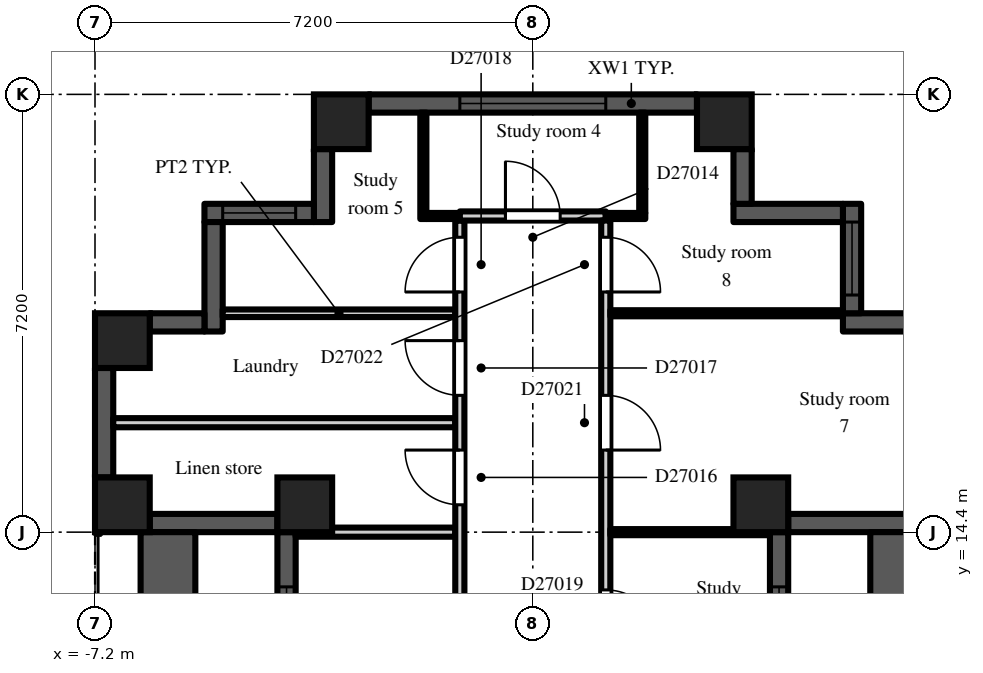
"""IFC4 building model, lengths in metres.
Left out: names, types, materials, properties, quantities, classifications, styles, units other than length and angle.
Written with IfcOpenShell. Run it as: python <this file> out.ifc"""

import sys

from ifc_helpers import new_model, si_unit, direction, frame, frame_2d, origin, origin_2d, place, context, subcontext, project, spatial, rectangle, extrude, element, fill, save


model = new_model("IFC4")
c1 = context("Model", 3, precision=1e-05, world=origin(), true_north=direction((0.0, 1.0)))
c2 = subcontext(c1, "Body", "Model", "MODEL_VIEW")
j1 = project(units=[si_unit("LENGTHUNIT", "METRE"), si_unit("PLANEANGLEUNIT", "RADIAN")], contexts=[c1])
p1 = place(None, origin())
s1 = spatial("IfcSite", under=j1, at=p1, CompositionType="ELEMENT")
p2 = place(p1, origin())
s2 = spatial("IfcBuilding", under=s1, at=p2, CompositionType="ELEMENT")
p3 = place(p2, frame((0.0, 0.0, 191.7)))
s3 = spatial("IfcBuildingStorey", under=s2, at=p3, CompositionType="ELEMENT", Elevation=191.7)
for number, where, z_axis, x_axis in (
    (1, (-6.75, 14.85, 0.0), (0.0, 0.0, 1.0), (1.0, 0.0, 0.0)),
    (2, (-6.75, 17.55, 0.0), (0.0, 0.0, 1.0), (1.0, 0.0, 0.0)),
    (3, (-3.75, 14.85, 0.0), (0.0, 0.0, 1.0), (1.0, 0.0, 0.0)),
    (4, (-3.15, 21.15, 0.0), (0.0, 0.0, 1.0), (1.0, 0.0, 0.0)),
    (5, (3.15, 21.15, 0.0), (0.0, 0.0, 1.0), (1.0, 0.0, 0.0)),
    (6, (3.75, 14.85, 0.0), (0.0, 0.0, 1.0), (1.0, 0.0, 0.0)),
):
    element("IfcColumn", number, at=place(p3, frame(where, z_axis=z_axis, x_axis=x_axis)), inside=s3, PredefinedType="COLUMN", context=c2, shape_type="SweptSolid", body=[
        extrude(rectangle(XDim=0.9, YDim=0.9, at=origin_2d()), origin(), (0.0, 0.0, 1.0), 3.0),
    ])
p4 = place(p3, frame((4.05, 7.2, 0.0), z_axis=(0.0, 0.0, 1.0), x_axis=(0.0, 1.0, 0.0)))
e7 = element("IfcWall", 7, at=p4, inside=s3, PredefinedType="SOLIDWALL", context=c2, shape_type="SweptSolid", body=[
    extrude(rectangle(XDim=7.2, YDim=0.3, at=frame_2d((3.6, 0.0))), origin(), (0.0, 0.0, 1.0), 2.55),
])
p5 = place(p4, frame((3.0, 0.0, 0.0)))
e8 = element("IfcOpeningElement", 8, at=p5, cuts=e7, PredefinedType="OPENING", context=c2, shape_type="SweptSolid", body=[
    extrude(rectangle(XDim=1.2, YDim=2.05, at=frame_2d((0.6, 1.025))), frame((0.0, 0.16, 0.0), z_axis=(0.0, -1.0, 0.0), x_axis=(1.0, 0.0, 0.0)), (0.0, 0.0, 1.0), 0.32),
])
p6 = place(p4, frame((0.9, 0.0, 0.2)))
e9 = element("IfcOpeningElement", 9, at=p6, cuts=e7, PredefinedType="OPENING", context=c2, shape_type="SweptSolid", body=[
    extrude(rectangle(XDim=1.8, YDim=1.85, at=frame_2d((0.9, 0.925))), frame((0.0, 0.16, 0.0), z_axis=(0.0, -1.0, 0.0), x_axis=(1.0, 0.0, 0.0)), (0.0, 0.0, 1.0), 0.32),
])
p7 = place(p4, frame((4.5, 0.0, 0.2)))
e10 = element("IfcOpeningElement", 10, at=p7, cuts=e7, PredefinedType="OPENING", context=c2, shape_type="SweptSolid", body=[
    extrude(rectangle(XDim=1.8, YDim=1.85, at=frame_2d((0.9, 0.925))), frame((0.0, 0.16, 0.0), z_axis=(0.0, -1.0, 0.0), x_axis=(1.0, 0.0, 0.0)), (0.0, 0.0, 1.0), 0.32),
])
p8 = place(p3, frame((4.2, 14.55, 0.0), z_axis=(0.0, 0.0, 1.0), x_axis=(1.0, 0.0, 0.0)))
e11 = element("IfcWall", 11, at=p8, inside=s3, PredefinedType="SOLIDWALL", context=c2, shape_type="SweptSolid", body=[
    extrude(rectangle(XDim=2.1, YDim=0.3, at=frame_2d((1.05, 0.0))), origin(), (0.0, 0.0, 1.0), 2.55),
])
p9 = place(p3, frame((6.3, 17.85, 0.0), z_axis=(0.0, 0.0, 1.0), x_axis=(-1.0, 0.0, 0.0)))
e12 = element("IfcWall", 12, at=p9, inside=s3, PredefinedType="SOLIDWALL", context=c2, shape_type="SweptSolid", body=[
    extrude(rectangle(XDim=1.2, YDim=0.3, at=frame_2d((0.6, 0.0))), origin(), (0.0, 0.0, 1.0), 2.55),
])
p10 = place(p3, frame((5.25, 18.0, 0.0), z_axis=(0.0, 0.0, 1.0), x_axis=(0.0, 1.0, 0.0)))
e13 = element("IfcWall", 13, at=p10, inside=s3, PredefinedType="SOLIDWALL", context=c2, shape_type="SweptSolid", body=[
    extrude(rectangle(XDim=1.8, YDim=0.3, at=frame_2d((0.9, 0.0))), origin(), (0.0, 0.0, 1.0), 2.55),
])
p11 = place(p10, frame((0.3, 0.0, 0.2)))
e14 = element("IfcOpeningElement", 14, at=p11, cuts=e13, PredefinedType="OPENING", context=c2, shape_type="SweptSolid", body=[
    extrude(rectangle(XDim=1.2, YDim=1.85, at=frame_2d((0.6, 0.925))), frame((0.0, 0.16, 0.0), z_axis=(0.0, -1.0, 0.0), x_axis=(1.0, 0.0, 0.0)), (0.0, 0.0, 1.0), 0.32),
])
p12 = place(p3, frame((5.1, 19.65, 0.0), z_axis=(0.0, 0.0, 1.0), x_axis=(-1.0, 0.0, 0.0)))
e15 = element("IfcWall", 15, at=p12, inside=s3, PredefinedType="SOLIDWALL", context=c2, shape_type="SweptSolid", body=[
    extrude(rectangle(XDim=1.8, YDim=0.3, at=frame_2d((0.9, 0.0))), origin(), (0.0, 0.0, 1.0), 2.55),
])
p13 = place(p3, frame((3.45, 19.8, 0.0), z_axis=(0.0, 0.0, 1.0), x_axis=(0.0, 1.0, 0.0)))
e16 = element("IfcWall", 16, at=p13, inside=s3, PredefinedType="SOLIDWALL", context=c2, shape_type="SweptSolid", body=[
    extrude(rectangle(XDim=0.9, YDim=0.3, at=frame_2d((0.45, 0.0))), origin(), (0.0, 0.0, 1.0), 2.55),
])
p14 = place(p3, frame((2.7, 21.45, 0.0), z_axis=(0.0, 0.0, 1.0), x_axis=(-1.0, 0.0, 0.0)))
e17 = element("IfcWall", 17, at=p14, inside=s3, PredefinedType="SOLIDWALL", context=c2, shape_type="SweptSolid", body=[
    extrude(rectangle(XDim=5.4, YDim=0.3, at=frame_2d((2.7, 0.0))), origin(), (0.0, 0.0, 1.0), 2.3),
])
p15 = place(p14, frame((1.5, 0.0, 0.2)))
e18 = element("IfcOpeningElement", 18, at=p15, cuts=e17, PredefinedType="OPENING", context=c2, shape_type="SweptSolid", body=[
    extrude(rectangle(XDim=2.4, YDim=1.85, at=frame_2d((1.2, 0.925))), frame((0.0, 0.16, 0.0), z_axis=(0.0, -1.0, 0.0), x_axis=(1.0, 0.0, 0.0)), (0.0, 0.0, 1.0), 0.32),
])
p16 = place(p3, frame((-3.45, 20.7, 0.0), z_axis=(0.0, 0.0, 1.0), x_axis=(0.0, -1.0, 0.0)))
e19 = element("IfcWall", 19, at=p16, inside=s3, PredefinedType="SOLIDWALL", context=c2, shape_type="SweptSolid", body=[
    extrude(rectangle(XDim=1.2, YDim=0.3, at=frame_2d((0.6, 0.0))), origin(), (0.0, 0.0, 1.0), 2.55),
])
p17 = place(p3, frame((-3.6, 19.65, 0.0), z_axis=(0.0, 0.0, 1.0), x_axis=(-1.0, 0.0, 0.0)))
e20 = element("IfcWall", 20, at=p17, inside=s3, PredefinedType="SOLIDWALL", context=c2, shape_type="SweptSolid", body=[
    extrude(rectangle(XDim=1.8, YDim=0.3, at=frame_2d((0.9, 0.0))), origin(), (0.0, 0.0, 1.0), 2.55),
])
p18 = place(p17, frame((0.3, 0.0, 0.2)))
e21 = element("IfcOpeningElement", 21, at=p18, cuts=e20, PredefinedType="OPENING", context=c2, shape_type="SweptSolid", body=[
    extrude(rectangle(XDim=1.2, YDim=1.85, at=frame_2d((0.6, 0.925))), frame((0.0, 0.16, 0.0), z_axis=(0.0, -1.0, 0.0), x_axis=(1.0, 0.0, 0.0)), (0.0, 0.0, 1.0), 0.32),
])
p19 = place(p3, frame((-5.25, 19.5, 0.0), z_axis=(0.0, 0.0, 1.0), x_axis=(0.0, -1.0, 0.0)))
e22 = element("IfcWall", 22, at=p19, inside=s3, PredefinedType="SOLIDWALL", context=c2, shape_type="SweptSolid", body=[
    extrude(rectangle(XDim=1.8, YDim=0.3, at=frame_2d((0.9, 0.0))), origin(), (0.0, 0.0, 1.0), 2.55),
])
p20 = place(p3, frame((-5.4, 17.85, 0.0), z_axis=(0.0, 0.0, 1.0), x_axis=(-1.0, 0.0, 0.0)))
e23 = element("IfcWall", 23, at=p20, inside=s3, PredefinedType="SOLIDWALL", context=c2, shape_type="SweptSolid", body=[
    extrude(rectangle(XDim=0.9, YDim=0.3, at=frame_2d((0.45, 0.0))), origin(), (0.0, 0.0, 1.0), 2.55),
])
p21 = place(p3, frame((-7.05, 17.1, 0.0), z_axis=(0.0, 0.0, 1.0), x_axis=(0.0, -1.0, 0.0)))
e24 = element("IfcWall", 24, at=p21, inside=s3, PredefinedType="SOLIDWALL", context=c2, shape_type="SweptSolid", body=[
    extrude(rectangle(XDim=1.8, YDim=0.3, at=frame_2d((0.9, 0.0))), origin(), (0.0, 0.0, 1.0), 2.3),
])
p22 = place(p3, frame((-6.3, 14.55, 0.0), z_axis=(0.0, 0.0, 1.0), x_axis=(1.0, 0.0, 0.0)))
e25 = element("IfcWall", 25, at=p22, inside=s3, PredefinedType="SOLIDWALL", context=c2, shape_type="SweptSolid", body=[
    extrude(rectangle(XDim=2.1, YDim=0.3, at=frame_2d((1.05, 0.0))), origin(), (0.0, 0.0, 1.0), 2.55),
])
p23 = place(p3, frame((-4.05, 14.4, 0.0), z_axis=(0.0, 0.0, 1.0), x_axis=(0.0, -1.0, 0.0)))
e26 = element("IfcWall", 26, at=p23, inside=s3, PredefinedType="SOLIDWALL", context=c2, shape_type="SweptSolid", body=[
    extrude(rectangle(XDim=7.2, YDim=0.3, at=frame_2d((3.6, 0.0))), origin(), (0.0, 0.0, 1.0), 2.55),
])
p24 = place(p23, frame((3.0, 0.0, 0.0)))
e27 = element("IfcOpeningElement", 27, at=p24, cuts=e26, PredefinedType="OPENING", context=c2, shape_type="SweptSolid", body=[
    extrude(rectangle(XDim=1.2, YDim=2.05, at=frame_2d((0.6, 1.025))), frame((0.0, 0.16, 0.0), z_axis=(0.0, -1.0, 0.0), x_axis=(1.0, 0.0, 0.0)), (0.0, 0.0, 1.0), 0.32),
])
p25 = place(p23, frame((0.9, 0.0, 0.2)))
e28 = element("IfcOpeningElement", 28, at=p25, cuts=e26, PredefinedType="OPENING", context=c2, shape_type="SweptSolid", body=[
    extrude(rectangle(XDim=1.8, YDim=1.85, at=frame_2d((0.9, 0.925))), frame((0.0, 0.16, 0.0), z_axis=(0.0, -1.0, 0.0), x_axis=(1.0, 0.0, 0.0)), (0.0, 0.0, 1.0), 0.32),
])
p26 = place(p23, frame((4.5, 0.0, 0.2)))
e29 = element("IfcOpeningElement", 29, at=p26, cuts=e26, PredefinedType="OPENING", context=c2, shape_type="SweptSolid", body=[
    extrude(rectangle(XDim=1.8, YDim=1.85, at=frame_2d((0.9, 0.925))), frame((0.0, 0.16, 0.0), z_axis=(0.0, -1.0, 0.0), x_axis=(1.0, 0.0, 0.0)), (0.0, 0.0, 1.0), 0.32),
])
for number, where, z_axis, x_axis in (
    (30, (6.0, 7.2, 0.0), (0.0, 0.0, 1.0), (0.0, 1.0, 0.0)),
    (31, (-6.0, 7.2, 0.0), (0.0, 0.0, 1.0), (0.0, 1.0, 0.0)),
):
    element("IfcWall", number, at=place(p3, frame(where, z_axis=z_axis, x_axis=x_axis)), inside=s3, PredefinedType="PARAPET", context=c2, shape_type="SweptSolid", body=[
        extrude(rectangle(XDim=7.2, YDim=0.9, at=frame_2d((3.6, 0.0))), origin(), (0.0, 0.0, 1.0), 0.8),
    ])
p27 = place(p3, frame((-6.9, 16.2, 0.0), z_axis=(0.0, 0.0, 1.0), x_axis=(1.0, 0.0, 0.0)))
e32 = element("IfcWall", 32, at=p27, inside=s3, PredefinedType="PARTITIONING", context=c2, shape_type="SweptSolid", body=[
    extrude(rectangle(XDim=5.625, YDim=0.15, at=frame_2d((2.812, 0.0))), origin(), (0.0, 0.0, 1.0), 2.55),
])
p28 = place(p3, frame((-5.1, 18.0, 0.0), z_axis=(0.0, 0.0, 1.0), x_axis=(1.0, 0.0, 0.0)))
e33 = element("IfcWall", 33, at=p28, inside=s3, PredefinedType="PARTITIONING", context=c2, shape_type="SweptSolid", body=[
    extrude(rectangle(XDim=3.825, YDim=0.125, at=frame_2d((1.913, 0.0))), origin(), (0.0, 0.0, 1.0), 2.55),
])
p29 = place(p3, frame((-3.9, 14.4, 0.0), z_axis=(0.0, 0.0, 1.0), x_axis=(1.0, 0.0, 0.0)))
e34 = element("IfcWall", 34, at=p29, inside=s3, PredefinedType="PARTITIONING", context=c2, shape_type="SweptSolid", body=[
    extrude(rectangle(XDim=2.625, YDim=0.15, at=frame_2d((1.312, 0.0))), origin(), (0.0, 0.0, 1.0), 2.55),
])
p30 = place(p3, frame((-1.8, 19.55, 0.0), z_axis=(0.0, 0.0, 1.0), x_axis=(0.0, 1.0, 0.0)))
e35 = element("IfcWall", 35, at=p30, inside=s3, PredefinedType="PARTITIONING", context=c2, shape_type="SweptSolid", body=[
    extrude(rectangle(XDim=1.75, YDim=0.1, at=frame_2d((0.875, 0.0))), origin(), (0.0, 0.0, 1.0), 2.55),
])
p31 = place(p3, frame((-1.75, 19.6, 0.0), z_axis=(0.0, 0.0, 1.0), x_axis=(1.0, 0.0, 0.0)))
e36 = element("IfcWall", 36, at=p31, inside=s3, PredefinedType="PARTITIONING", context=c2, shape_type="SweptSolid", body=[
    extrude(rectangle(XDim=0.55, YDim=0.1, at=frame_2d((0.275, 0.0))), origin(), (0.0, 0.0, 1.0), 2.55),
])
p32 = place(p3, frame((-1.2, 1.275, 0.0), z_axis=(0.0, 0.0, 1.0), x_axis=(0.0, 1.0, 0.0)))
e37 = element("IfcWall", 37, at=p32, inside=s3, PredefinedType="PARTITIONING", context=c2, shape_type="SweptSolid", body=[
    extrude(rectangle(XDim=18.25, YDim=0.15, at=frame_2d((9.125, 0.0))), origin(), (0.0, 0.0, 1.0), 2.55),
])
p33 = place(p32, frame((2.475, 0.0, 0.0)))
e38 = element("IfcOpeningElement", 38, at=p33, cuts=e37, PredefinedType="OPENING", context=c2, shape_type="SweptSolid", body=[
    extrude(rectangle(XDim=0.9, YDim=2.1, at=frame_2d((0.45, 1.05))), frame((0.0, 0.085, 0.0), z_axis=(0.0, -1.0, 0.0), x_axis=(1.0, 0.0, 0.0)), (0.0, 0.0, 1.0), 0.17),
])
p34 = place(p32, frame((10.875, 0.0, 0.0)))
e39 = element("IfcOpeningElement", 39, at=p34, cuts=e37, PredefinedType="OPENING", context=c2, shape_type="SweptSolid", body=[
    extrude(rectangle(XDim=0.9, YDim=2.1, at=frame_2d((0.45, 1.05))), frame((0.0, 0.085, 0.0), z_axis=(0.0, -1.0, 0.0), x_axis=(1.0, 0.0, 0.0)), (0.0, 0.0, 1.0), 0.17),
])
p35 = place(p32, frame((13.575, 0.0, 0.0)))
e40 = element("IfcOpeningElement", 40, at=p35, cuts=e37, PredefinedType="OPENING", context=c2, shape_type="SweptSolid", body=[
    extrude(rectangle(XDim=0.9, YDim=2.1, at=frame_2d((0.45, 1.05))), frame((0.0, 0.085, 0.0), z_axis=(0.0, -1.0, 0.0), x_axis=(1.0, 0.0, 0.0)), (0.0, 0.0, 1.0), 0.17),
])
p36 = place(p32, frame((15.375, 0.0, 0.0)))
e41 = element("IfcOpeningElement", 41, at=p36, cuts=e37, PredefinedType="OPENING", context=c2, shape_type="SweptSolid", body=[
    extrude(rectangle(XDim=0.9, YDim=2.1, at=frame_2d((0.45, 1.05))), frame((0.0, 0.085, 0.0), z_axis=(0.0, -1.0, 0.0), x_axis=(1.0, 0.0, 0.0)), (0.0, 0.0, 1.0), 0.17),
])
p37 = place(p32, frame((17.075, 0.0, 0.0)))
e42 = element("IfcOpeningElement", 42, at=p37, cuts=e37, PredefinedType="OPENING", context=c2, shape_type="SweptSolid", body=[
    extrude(rectangle(XDim=0.9, YDim=2.1, at=frame_2d((0.45, 1.05))), frame((0.0, 0.085, 0.0), z_axis=(0.0, -1.0, 0.0), x_axis=(1.0, 0.0, 0.0)), (0.0, 0.0, 1.0), 0.17),
])
p38 = place(p3, frame((-1.2, 19.6, 0.0), z_axis=(0.0, 0.0, 1.0), x_axis=(1.0, 0.0, 0.0)))
e43 = element("IfcWall", 43, at=p38, inside=s3, PredefinedType="PARTITIONING", context=c2, shape_type="SweptSolid", body=[
    extrude(rectangle(XDim=2.4, YDim=0.15, at=frame_2d((1.2, 0.0))), origin(), (0.0, 0.0, 1.0), 2.55),
])
p39 = place(p38, frame((0.75, 0.0, 0.0)))
e44 = element("IfcOpeningElement", 44, at=p39, cuts=e43, PredefinedType="OPENING", context=c2, shape_type="SweptSolid", body=[
    extrude(rectangle(XDim=0.9, YDim=2.1, at=frame_2d((0.45, 1.05))), frame((0.0, 0.085, 0.0), z_axis=(0.0, -1.0, 0.0), x_axis=(1.0, 0.0, 0.0)), (0.0, 0.0, 1.0), 0.17),
])
p40 = place(p3, frame((1.2, 1.125, 0.0), z_axis=(0.0, 0.0, 1.0), x_axis=(0.0, 1.0, 0.0)))
e45 = element("IfcWall", 45, at=p40, inside=s3, PredefinedType="PARTITIONING", context=c2, shape_type="SweptSolid", body=[
    extrude(rectangle(XDim=18.4, YDim=0.15, at=frame_2d((9.2, 0.0))), origin(), (0.0, 0.0, 1.0), 2.55),
])
p41 = place(p40, frame((3.825, 0.0, 0.0)))
e46 = element("IfcOpeningElement", 46, at=p41, cuts=e45, PredefinedType="OPENING", context=c2, shape_type="SweptSolid", body=[
    extrude(rectangle(XDim=0.9, YDim=2.1, at=frame_2d((0.45, 1.05))), frame((0.0, 0.085, 0.0), z_axis=(0.0, -1.0, 0.0), x_axis=(1.0, 0.0, 0.0)), (0.0, 0.0, 1.0), 0.17),
])
p42 = place(p40, frame((11.425, 0.0, 0.0)))
e47 = element("IfcOpeningElement", 47, at=p42, cuts=e45, PredefinedType="OPENING", context=c2, shape_type="SweptSolid", body=[
    extrude(rectangle(XDim=0.9, YDim=2.1, at=frame_2d((0.45, 1.05))), frame((0.0, 0.085, 0.0), z_axis=(0.0, -1.0, 0.0), x_axis=(1.0, 0.0, 0.0)), (0.0, 0.0, 1.0), 0.17),
])
p43 = place(p40, frame((7.825, 0.0, 0.0)))
e48 = element("IfcOpeningElement", 48, at=p43, cuts=e45, PredefinedType="OPENING", context=c2, shape_type="SweptSolid", body=[
    extrude(rectangle(XDim=0.9, YDim=2.1, at=frame_2d((0.45, 1.05))), frame((0.0, 0.085, 0.0), z_axis=(0.0, -1.0, 0.0), x_axis=(1.0, 0.0, 0.0)), (0.0, 0.0, 1.0), 0.17),
])
p44 = place(p40, frame((14.625, 0.0, 0.0)))
e49 = element("IfcOpeningElement", 49, at=p44, cuts=e45, PredefinedType="OPENING", context=c2, shape_type="SweptSolid", body=[
    extrude(rectangle(XDim=0.9, YDim=2.1, at=frame_2d((0.45, 1.05))), frame((0.0, 0.085, 0.0), z_axis=(0.0, -1.0, 0.0), x_axis=(1.0, 0.0, 0.0)), (0.0, 0.0, 1.0), 0.17),
])
p45 = place(p40, frame((17.225, 0.0, 0.0)))
e50 = element("IfcOpeningElement", 50, at=p45, cuts=e45, PredefinedType="OPENING", context=c2, shape_type="SweptSolid", body=[
    extrude(rectangle(XDim=0.9, YDim=2.1, at=frame_2d((0.45, 1.05))), frame((0.0, 0.085, 0.0), z_axis=(0.0, -1.0, 0.0), x_axis=(1.0, 0.0, 0.0)), (0.0, 0.0, 1.0), 0.17),
])
p46 = place(p3, frame((1.275, 14.4, 0.0), z_axis=(0.0, 0.0, 1.0), x_axis=(1.0, 0.0, 0.0)))
e51 = element("IfcWall", 51, at=p46, inside=s3, PredefinedType="PARTITIONING", context=c2, shape_type="SweptSolid", body=[
    extrude(rectangle(XDim=2.625, YDim=0.1, at=frame_2d((1.312, 0.0))), origin(), (0.0, 0.0, 1.0), 2.55),
])
p47 = place(p3, frame((1.275, 18.0, 0.0), z_axis=(0.0, 0.0, 1.0), x_axis=(1.0, 0.0, 0.0)))
e52 = element("IfcWall", 52, at=p47, inside=s3, PredefinedType="PARTITIONING", context=c2, shape_type="SweptSolid", body=[
    extrude(rectangle(XDim=3.825, YDim=0.1, at=frame_2d((1.913, 0.0))), origin(), (0.0, 0.0, 1.0), 2.55),
])
p48 = place(p3, frame((1.2, 19.6, 0.0), z_axis=(0.0, 0.0, 1.0), x_axis=(1.0, 0.0, 0.0)))
e53 = element("IfcWall", 53, at=p48, inside=s3, PredefinedType="PARTITIONING", context=c2, shape_type="SweptSolid", body=[
    extrude(rectangle(XDim=0.65, YDim=0.1, at=frame_2d((0.325, 0.0))), origin(), (0.0, 0.0, 1.0), 2.55),
])
p49 = place(p3, frame((1.8, 19.65, 0.0), z_axis=(0.0, 0.0, 1.0), x_axis=(0.0, 1.0, 0.0)))
e54 = element("IfcWall", 54, at=p49, inside=s3, PredefinedType="PARTITIONING", context=c2, shape_type="SweptSolid", body=[
    extrude(rectangle(XDim=1.65, YDim=0.1, at=frame_2d((0.825, 0.0))), origin(), (0.0, 0.0, 1.0), 2.55),
])
p50 = place(p7, origin())
e55 = element("IfcWindow", 55, at=p50, inside=s3, PartitioningType="SINGLE_PANEL", PredefinedType="WINDOW", context=c2, shape_type="SweptSolid", body=[
    extrude(rectangle(XDim=1.8, YDim=1.85, at=frame_2d((0.9, 0.925))), frame((0.0, 0.03, 0.0), z_axis=(0.0, -1.0, 0.0), x_axis=(1.0, 0.0, 0.0)), (0.0, 0.0, 1.0), 0.06),
])
fill(e10, e55)
p51 = place(p11, origin())
e56 = element("IfcWindow", 56, at=p51, inside=s3, PartitioningType="SINGLE_PANEL", PredefinedType="WINDOW", context=c2, shape_type="SweptSolid", body=[
    extrude(rectangle(XDim=1.2, YDim=1.85, at=frame_2d((0.6, 0.925))), frame((0.0, 0.03, 0.0), z_axis=(0.0, -1.0, 0.0), x_axis=(1.0, 0.0, 0.0)), (0.0, 0.0, 1.0), 0.06),
])
fill(e14, e56)
p52 = place(p15, origin())
e57 = element("IfcWindow", 57, at=p52, inside=s3, PartitioningType="SINGLE_PANEL", PredefinedType="WINDOW", context=c2, shape_type="SweptSolid", body=[
    extrude(rectangle(XDim=2.4, YDim=1.85, at=frame_2d((1.2, 0.925))), frame((0.0, 0.03, 0.0), z_axis=(0.0, -1.0, 0.0), x_axis=(1.0, 0.0, 0.0)), (0.0, 0.0, 1.0), 0.06),
])
fill(e18, e57)
p53 = place(p18, origin())
e58 = element("IfcWindow", 58, at=p53, inside=s3, PartitioningType="SINGLE_PANEL", PredefinedType="WINDOW", context=c2, shape_type="SweptSolid", body=[
    extrude(rectangle(XDim=1.2, YDim=1.85, at=frame_2d((0.6, 0.925))), frame((0.0, 0.03, 0.0), z_axis=(0.0, -1.0, 0.0), x_axis=(1.0, 0.0, 0.0)), (0.0, 0.0, 1.0), 0.06),
])
fill(e21, e58)
p54 = place(p25, origin())
e59 = element("IfcWindow", 59, at=p54, inside=s3, PartitioningType="SINGLE_PANEL", PredefinedType="WINDOW", context=c2, shape_type="SweptSolid", body=[
    extrude(rectangle(XDim=1.8, YDim=1.85, at=frame_2d((0.9, 0.925))), frame((0.0, 0.03, 0.0), z_axis=(0.0, -1.0, 0.0), x_axis=(1.0, 0.0, 0.0)), (0.0, 0.0, 1.0), 0.06),
])
fill(e28, e59)
p55 = place(p39, origin())
e60 = element("IfcDoor", 60, at=p55, inside=s3, OperationType="SINGLE_SWING_LEFT", PredefinedType="DOOR", context=c2, shape_type="SweptSolid", body=[
    extrude(rectangle(XDim=0.9, YDim=2.1, at=frame_2d((0.45, 1.05))), frame((0.0, 0.025, 0.0), z_axis=(0.0, -1.0, 0.0), x_axis=(1.0, 0.0, 0.0)), (0.0, 0.0, 1.0), 0.05),
])
fill(e44, e60)
p56 = place(p35, origin())
e61 = element("IfcDoor", 61, at=p56, inside=s3, OperationType="SINGLE_SWING_RIGHT", PredefinedType="DOOR", context=c2, shape_type="SweptSolid", body=[
    extrude(rectangle(XDim=0.9, YDim=2.1, at=frame_2d((0.45, 1.05))), frame((0.0, 0.025, 0.0), z_axis=(0.0, -1.0, 0.0), x_axis=(1.0, 0.0, 0.0)), (0.0, 0.0, 1.0), 0.05),
])
fill(e40, e61)
p57 = place(p36, origin())
e62 = element("IfcDoor", 62, at=p57, inside=s3, OperationType="SINGLE_SWING_RIGHT", PredefinedType="DOOR", context=c2, shape_type="SweptSolid", body=[
    extrude(rectangle(XDim=0.9, YDim=2.1, at=frame_2d((0.45, 1.05))), frame((0.0, 0.025, 0.0), z_axis=(0.0, -1.0, 0.0), x_axis=(1.0, 0.0, 0.0)), (0.0, 0.0, 1.0), 0.05),
])
fill(e41, e62)
p58 = place(p37, origin())
e63 = element("IfcDoor", 63, at=p58, inside=s3, OperationType="SINGLE_SWING_LEFT", PredefinedType="DOOR", context=c2, shape_type="SweptSolid", body=[
    extrude(rectangle(XDim=0.9, YDim=2.1, at=frame_2d((0.45, 1.05))), frame((0.0, 0.025, 0.0), z_axis=(0.0, -1.0, 0.0), x_axis=(1.0, 0.0, 0.0)), (0.0, 0.0, 1.0), 0.05),
])
fill(e42, e63)
p59 = place(p42, frame((0.9, 0.0, 0.0), z_axis=(0.0, 0.0, 1.0), x_axis=(-1.0, 0.0, 0.0)))
e64 = element("IfcDoor", 64, at=p59, inside=s3, OperationType="SINGLE_SWING_RIGHT", PredefinedType="DOOR", context=c2, shape_type="SweptSolid", body=[
    extrude(rectangle(XDim=0.9, YDim=2.1, at=frame_2d((0.45, 1.05))), frame((0.0, 0.025, 0.0), z_axis=(0.0, -1.0, 0.0), x_axis=(1.0, 0.0, 0.0)), (0.0, 0.0, 1.0), 0.05),
])
fill(e47, e64)
p60 = place(p44, frame((0.9, 0.0, 0.0), z_axis=(0.0, 0.0, 1.0), x_axis=(-1.0, 0.0, 0.0)))
e65 = element("IfcDoor", 65, at=p60, inside=s3, OperationType="SINGLE_SWING_RIGHT", PredefinedType="DOOR", context=c2, shape_type="SweptSolid", body=[
    extrude(rectangle(XDim=0.9, YDim=2.1, at=frame_2d((0.45, 1.05))), frame((0.0, 0.025, 0.0), z_axis=(0.0, -1.0, 0.0), x_axis=(1.0, 0.0, 0.0)), (0.0, 0.0, 1.0), 0.05),
])
fill(e49, e65)
p61 = place(p45, frame((0.9, 0.0, 0.0), z_axis=(0.0, 0.0, 1.0), x_axis=(-1.0, 0.0, 0.0)))
e66 = element("IfcDoor", 66, at=p61, inside=s3, OperationType="SINGLE_SWING_RIGHT", PredefinedType="DOOR", context=c2, shape_type="SweptSolid", body=[
    extrude(rectangle(XDim=0.9, YDim=2.1, at=frame_2d((0.45, 1.05))), frame((0.0, 0.025, 0.0), z_axis=(0.0, -1.0, 0.0), x_axis=(1.0, 0.0, 0.0)), (0.0, 0.0, 1.0), 0.05),
])
fill(e50, e66)
save(model, sys.argv[1])
